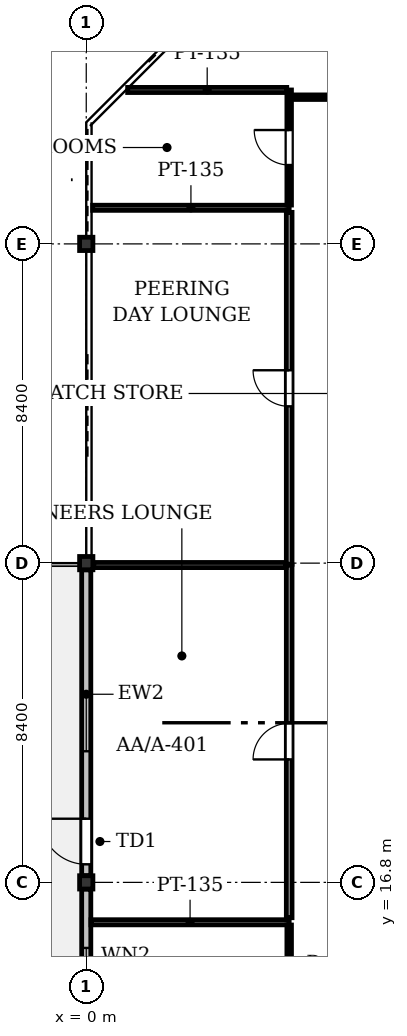
"""IFC4 building model, lengths in metres.
Left out: names, types, materials, properties, quantities, classifications, styles, units other than length and angle.
Written with IfcOpenShell. Run it as: python <this file> out.ifc"""

import sys

from ifc_helpers import new_model, si_unit, direction, frame, frame_2d, origin, origin_2d, place, context, subcontext, project, spatial, rectangle, i_section, extrude, element, fill, save


model = new_model("IFC4")
c1 = context("Model", 3, precision=1e-05, world=origin(), true_north=direction((0.0, 1.0)))
c2 = subcontext(c1, "Body", "Model", "MODEL_VIEW")
j1 = project(units=[si_unit("LENGTHUNIT", "METRE"), si_unit("PLANEANGLEUNIT", "RADIAN")], contexts=[c1])
p1 = place(None, origin())
s1 = spatial("IfcSite", under=j1, at=p1, CompositionType="ELEMENT")
p2 = place(p1, origin())
s2 = spatial("IfcBuilding", under=s1, at=p2, CompositionType="ELEMENT")
p3 = place(p2, frame((0.0, 0.0, 220.6)))
s3 = spatial("IfcBuildingStorey", under=s2, at=p3, CompositionType="ELEMENT", Elevation=220.6)
for number, where, z_axis, x_axis in (
    (1, (0.0, 16.8, 0.0), (0.0, 0.0, 1.0), (1.0, 0.0, 0.0)),
    (2, (0.0, 25.2, 0.0), (0.0, 0.0, 1.0), (1.0, 0.0, 0.0)),
    (3, (0.0, 33.6, 0.0), (0.0, 0.0, 1.0), (1.0, 0.0, 0.0)),
):
    element("IfcColumn", number, at=place(p3, frame(where, z_axis=z_axis, x_axis=x_axis)), inside=s3, PredefinedType="COLUMN", context=c2, shape_type="SweptSolid", body=[
        extrude(i_section(OverallWidth=0.35, OverallDepth=0.35, WebThickness=0.02, FlangeThickness=0.032, at=origin_2d()), origin(), (0.0, 0.0, 1.0), 4.1),
    ])
p4 = place(p3, frame((0.0, 8.575, 0.0), z_axis=(0.0, 0.0, 1.0), x_axis=(0.0, 1.0, 0.0)))
e4 = element("IfcWall", 4, at=p4, inside=s3, PredefinedType="STANDARD", context=c2, shape_type="SweptSolid", body=[
    extrude(rectangle(XDim=8.05, YDim=0.24, at=frame_2d((4.025, 0.0))), origin(), (0.0, 0.0, 1.0), 3.525),
])
p5 = place(p4, frame((0.3, 0.0, 0.0)))
e5 = element("IfcOpeningElement", 5, at=p5, cuts=e4, PredefinedType="OPENING", context=c2, shape_type="SweptSolid", body=[
    extrude(rectangle(XDim=1.2, YDim=2.2, at=frame_2d((0.6, 1.1))), frame((0.0, 0.13, 0.0), z_axis=(0.0, -1.0, 0.0), x_axis=(1.0, 0.0, 0.0)), (0.0, 0.0, 1.0), 0.26),
])
p6 = place(p4, frame((4.7, 0.0, 0.9)))
e6 = element("IfcOpeningElement", 6, at=p6, cuts=e4, PredefinedType="OPENING", context=c2, shape_type="SweptSolid", body=[
    extrude(rectangle(XDim=1.8, YDim=1.6, at=frame_2d((0.9, 0.8))), frame((0.0, 0.13, 0.0), z_axis=(0.0, -1.0, 0.0), x_axis=(1.0, 0.0, 0.0)), (0.0, 0.0, 1.0), 0.26),
])
p7 = place(p3, frame((0.0, 16.975, 0.0), z_axis=(0.0, 0.0, 1.0), x_axis=(0.0, 1.0, 0.0)))
e7 = element("IfcWall", 7, at=p7, inside=s3, PredefinedType="STANDARD", context=c2, shape_type="SweptSolid", body=[
    extrude(rectangle(XDim=8.05, YDim=0.24, at=frame_2d((4.025, 0.0))), origin(), (0.0, 0.0, 1.0), 3.525),
])
p8 = place(p7, frame((0.3, 0.0, 0.0)))
e8 = element("IfcOpeningElement", 8, at=p8, cuts=e7, PredefinedType="OPENING", context=c2, shape_type="SweptSolid", body=[
    extrude(rectangle(XDim=1.2, YDim=2.2, at=frame_2d((0.6, 1.1))), frame((0.0, 0.13, 0.0), z_axis=(0.0, -1.0, 0.0), x_axis=(1.0, 0.0, 0.0)), (0.0, 0.0, 1.0), 0.26),
])
p9 = place(p7, frame((3.275, 0.0, 0.9)))
e9 = element("IfcOpeningElement", 9, at=p9, cuts=e7, PredefinedType="OPENING", context=c2, shape_type="SweptSolid", body=[
    extrude(rectangle(XDim=1.5, YDim=1.6, at=frame_2d((0.75, 0.8))), frame((0.0, 0.13, 0.0), z_axis=(0.0, -1.0, 0.0), x_axis=(1.0, 0.0, 0.0)), (0.0, 0.0, 1.0), 0.26),
])
p10 = place(p3, frame((5.34, 15.75, 0.0), z_axis=(0.0, 0.0, 1.0), x_axis=(-1.0, 0.0, 0.0)))
e10 = element("IfcWall", 10, at=p10, inside=s3, PredefinedType="PARTITIONING", context=c2, shape_type="SweptSolid", body=[
    extrude(rectangle(XDim=5.216, YDim=0.135, at=frame_2d((2.608, 0.0))), origin(), (0.0, 0.0, 1.0), 3.518),
])
p11 = place(p3, frame((5.34, 12.671, 0.0), z_axis=(0.0, 0.0, 1.0), x_axis=(0.0, 1.0, 0.0)))
e11 = element("IfcWall", 11, at=p11, inside=s3, PredefinedType="PARTITIONING", context=c2, shape_type="SweptSolid", body=[
    extrude(rectangle(XDim=3.007, YDim=0.12, at=frame_2d((1.503, 0.0))), origin(), (0.0, 0.0, 1.0), 3.825),
])
p12 = place(p11, frame((1.043, 0.0, 0.0)))
e12 = element("IfcOpeningElement", 12, at=p12, cuts=e11, PredefinedType="OPENING", context=c2, shape_type="SweptSolid", body=[
    extrude(rectangle(XDim=0.92, YDim=2.1, at=frame_2d((0.46, 1.05))), frame((0.0, 0.07, 0.0), z_axis=(0.0, -1.0, 0.0), x_axis=(1.0, 0.0, 0.0)), (0.0, 0.0, 1.0), 0.14),
])
p13 = place(p3, frame((0.169, 34.55, 0.0), z_axis=(0.0, 0.0, 1.0), x_axis=(1.0, 0.0, 0.0)))
e13 = element("IfcWall", 13, at=p13, inside=s3, PredefinedType="PARTITIONING", context=c2, shape_type="SweptSolid", body=[
    extrude(rectangle(XDim=5.171, YDim=0.135, at=frame_2d((2.585, 0.0))), origin(), (0.0, 0.0, 1.0), 3.825),
])
p14 = place(p3, frame((5.34, 34.622, 0.0), z_axis=(0.0, 0.0, 1.0), x_axis=(0.0, 1.0, 0.0)))
e14 = element("IfcWall", 14, at=p14, inside=s3, PredefinedType="PARTITIONING", context=c2, shape_type="SweptSolid", body=[
    extrude(rectangle(XDim=3.028, YDim=0.12, at=frame_2d((1.514, 0.0))), origin(), (0.0, 0.0, 1.0), 3.825),
])
p15 = place(p14, frame((1.054, 0.0, 0.0)))
e15 = element("IfcOpeningElement", 15, at=p15, cuts=e14, PredefinedType="OPENING", context=c2, shape_type="SweptSolid", body=[
    extrude(rectangle(XDim=0.92, YDim=2.1, at=frame_2d((0.46, 1.05))), frame((0.0, 0.07, 0.0), z_axis=(0.0, -1.0, 0.0), x_axis=(1.0, 0.0, 0.0)), (0.0, 0.0, 1.0), 0.14),
])
p16 = place(p3, frame((5.276, 37.65, 0.0), z_axis=(0.0, 0.0, 1.0), x_axis=(-1.0, 0.0, 0.0)))
e16 = element("IfcWall", 16, at=p16, inside=s3, PredefinedType="PARTITIONING", context=c2, shape_type="SweptSolid", body=[
    extrude(rectangle(XDim=4.187, YDim=0.135, at=frame_2d((2.093, 0.0))), origin(), (0.0, 0.0, 1.0), 3.825),
])
p17 = place(p3, frame((5.34, 15.87, 0.0), z_axis=(0.0, 0.0, 1.0), x_axis=(0.0, 1.0, 0.0)))
e17 = element("IfcWall", 17, at=p17, inside=s3, PredefinedType="PARTITIONING", context=c2, shape_type="SweptSolid", body=[
    extrude(rectangle(XDim=9.28, YDim=0.15, at=frame_2d((4.64, 0.0))), origin(), (0.0, 0.0, 1.0), 3.365),
])
p18 = place(p17, frame((4.165, 0.0, 0.0)))
e18 = element("IfcOpeningElement", 18, at=p18, cuts=e17, PredefinedType="OPENING", context=c2, shape_type="SweptSolid", body=[
    extrude(rectangle(XDim=0.95, YDim=2.15, at=frame_2d((0.475, 1.075))), frame((0.0, 0.085, 0.0), z_axis=(0.0, -1.0, 0.0), x_axis=(1.0, 0.0, 0.0)), (0.0, 0.0, 1.0), 0.17),
])
p19 = place(p3, frame((5.261, 25.15, 0.0), z_axis=(0.0, 0.0, 1.0), x_axis=(-1.0, 0.0, 0.0)))
e19 = element("IfcWall", 19, at=p19, inside=s3, PredefinedType="PARTITIONING", context=c2, shape_type="SweptSolid", body=[
    extrude(rectangle(XDim=5.066, YDim=0.135, at=frame_2d((2.533, 0.0))), origin(), (0.0, 0.0, 1.0), 3.365),
])
p20 = place(p3, frame((5.34, 25.17, 0.0), z_axis=(0.0, 0.0, 1.0), x_axis=(0.0, 1.0, 0.0)))
e20 = element("IfcWall", 20, at=p20, inside=s3, PredefinedType="PARTITIONING", context=c2, shape_type="SweptSolid", body=[
    extrude(rectangle(XDim=9.26, YDim=0.15, at=frame_2d((4.63, 0.0))), origin(), (0.0, 0.0, 1.0), 3.365),
])
p21 = place(p20, frame((4.155, 0.0, 0.0)))
e21 = element("IfcOpeningElement", 21, at=p21, cuts=e20, PredefinedType="OPENING", context=c2, shape_type="SweptSolid", body=[
    extrude(rectangle(XDim=0.95, YDim=2.15, at=frame_2d((0.475, 1.075))), frame((0.0, 0.085, 0.0), z_axis=(0.0, -1.0, 0.0), x_axis=(1.0, 0.0, 0.0)), (0.0, 0.0, 1.0), 0.17),
])
p22 = place(p3, frame((5.46, 37.46, 0.0), z_axis=(0.0, 0.0, 1.0), x_axis=(1.0, 0.0, 0.0)))
e22 = element("IfcWall", 22, at=p22, inside=s3, PredefinedType="PARTITIONING", context=c2, shape_type="SweptSolid", body=[
    extrude(rectangle(XDim=2.19, YDim=0.12, at=frame_2d((1.095, 0.0))), origin(), (0.0, 0.0, 1.0), 3.825),
])
p23 = place(p6, origin())
e23 = element("IfcWindow", 23, at=p23, inside=s3, PartitioningType="SINGLE_PANEL", PredefinedType="WINDOW", context=c2, shape_type="SweptSolid", body=[
    extrude(rectangle(XDim=1.8, YDim=1.6, at=frame_2d((0.9, 0.8))), frame((0.0, 0.03, 0.0), z_axis=(0.0, -1.0, 0.0), x_axis=(1.0, 0.0, 0.0)), (0.0, 0.0, 1.0), 0.06),
])
fill(e6, e23)
p24 = place(p8, origin())
e24 = element("IfcDoor", 24, at=p24, inside=s3, OperationType="SINGLE_SWING_RIGHT", PredefinedType="DOOR", context=c2, shape_type="SweptSolid", body=[
    extrude(rectangle(XDim=1.2, YDim=2.2, at=frame_2d((0.6, 1.1))), frame((0.0, 0.025, 0.0), z_axis=(0.0, -1.0, 0.0), x_axis=(1.0, 0.0, 0.0)), (0.0, 0.0, 1.0), 0.05),
])
fill(e8, e24)
p25 = place(p9, origin())
e25 = element("IfcWindow", 25, at=p25, inside=s3, PartitioningType="SINGLE_PANEL", PredefinedType="WINDOW", context=c2, shape_type="SweptSolid", body=[
    extrude(rectangle(XDim=1.5, YDim=1.6, at=frame_2d((0.75, 0.8))), frame((0.0, 0.03, 0.0), z_axis=(0.0, -1.0, 0.0), x_axis=(1.0, 0.0, 0.0)), (0.0, 0.0, 1.0), 0.06),
])
fill(e9, e25)
p26 = place(p15, origin())
e26 = element("IfcDoor", 26, at=p26, inside=s3, OperationType="SINGLE_SWING_RIGHT", PredefinedType="DOOR", context=c2, shape_type="SweptSolid", body=[
    extrude(rectangle(XDim=0.92, YDim=2.1, at=frame_2d((0.46, 1.05))), frame((0.0, 0.025, 0.0), z_axis=(0.0, -1.0, 0.0), x_axis=(1.0, 0.0, 0.0)), (0.0, 0.0, 1.0), 0.05),
])
fill(e15, e26)
p27 = place(p18, origin())
e27 = element("IfcDoor", 27, at=p27, inside=s3, OperationType="SINGLE_SWING_LEFT", PredefinedType="DOOR", context=c2, shape_type="SweptSolid", body=[
    extrude(rectangle(XDim=0.95, YDim=2.15, at=frame_2d((0.475, 1.075))), frame((0.0, 0.025, 0.0), z_axis=(0.0, -1.0, 0.0), x_axis=(1.0, 0.0, 0.0)), (0.0, 0.0, 1.0), 0.05),
])
fill(e18, e27)
p28 = place(p21, origin())
e28 = element("IfcDoor", 28, at=p28, inside=s3, OperationType="SINGLE_SWING_RIGHT", PredefinedType="DOOR", context=c2, shape_type="SweptSolid", body=[
    extrude(rectangle(XDim=0.95, YDim=2.15, at=frame_2d((0.475, 1.075))), frame((0.0, 0.025, 0.0), z_axis=(0.0, -1.0, 0.0), x_axis=(1.0, 0.0, 0.0)), (0.0, 0.0, 1.0), 0.05),
])
fill(e21, e28)
save(model, sys.argv[1])
